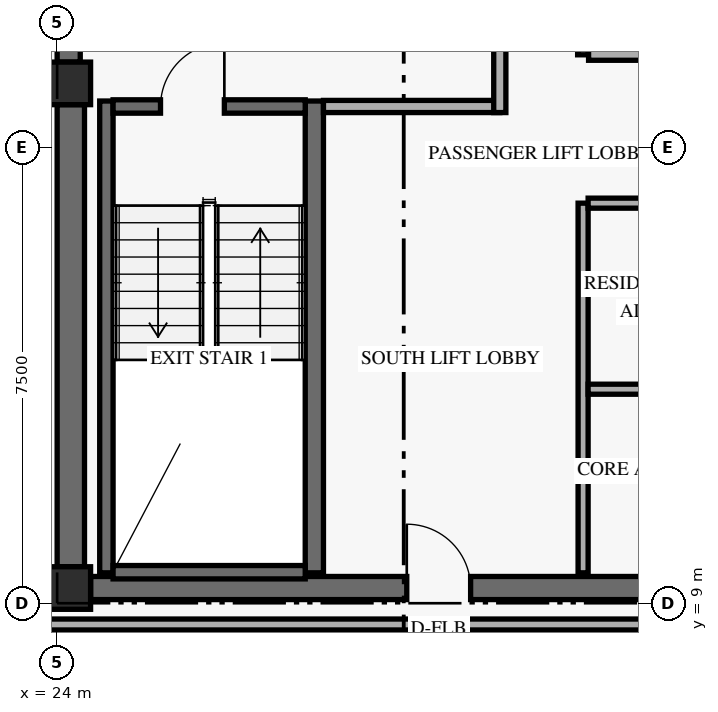
"""IFC4 building model, lengths in metres.
Left out: names, types, materials, properties, quantities, classifications, styles, units other than length and angle.
Written with IfcOpenShell. Run it as: python <this file> out.ifc"""

import sys

from ifc_helpers import new_model, si_unit, direction, frame, frame_2d, origin, origin_2d, place, context, subcontext, project, spatial, rectangle, extrude, element, fill, save


model = new_model("IFC4")
c1 = context("Model", 3, precision=1e-05, world=origin(), true_north=direction((0.0, 1.0)))
c2 = subcontext(c1, "Body", "Model", "MODEL_VIEW")
j1 = project(units=[si_unit("LENGTHUNIT", "METRE"), si_unit("PLANEANGLEUNIT", "RADIAN")], contexts=[c1])
p1 = place(None, origin())
s1 = spatial("IfcSite", under=j1, at=p1, CompositionType="ELEMENT")
p2 = place(p1, origin())
s2 = spatial("IfcBuilding", under=s1, at=p2, CompositionType="ELEMENT")
p3 = place(p2, frame((0.0, 0.0, 181.2)))
s3 = spatial("IfcBuildingStorey", under=s2, at=p3, CompositionType="ELEMENT", Elevation=181.2)
p4 = place(p3, frame((24.225, 9.6, 0.0), z_axis=(0.0, 0.0, 1.0), x_axis=(0.0, 1.0, 0.0)))
e1 = element("IfcWall", 1, at=p4, inside=s3, PredefinedType="SHEAR", context=c2, shape_type="SweptSolid", body=[
    extrude(rectangle(XDim=7.6, YDim=0.45, at=frame_2d((3.8, 0.0))), origin(), (0.0, 0.0, 1.0), 2.748),
])
p5 = place(p3, frame((24.19, 17.9, 0.0), z_axis=(0.0, 0.0, 1.0), x_axis=(0.0, 1.0, 0.0)))
e2 = element("IfcWall", 2, at=p5, inside=s3, PredefinedType="SHEAR", context=c2, shape_type="SweptSolid", body=[
    extrude(rectangle(XDim=11.95, YDim=0.38, at=frame_2d((5.975, 0.0))), origin(), (0.0, 0.0, 1.0), 2.748),
])
p6 = place(p3, frame((24.55, 9.25, 0.0), z_axis=(0.0, 0.0, 1.0), x_axis=(1.0, 0.0, 0.0)))
e3 = element("IfcWall", 3, at=p6, inside=s3, PredefinedType="SHEAR", context=c2, shape_type="SweptSolid", body=[
    extrude(rectangle(XDim=10.3, YDim=0.38, at=frame_2d((5.15, 0.0))), origin(), (0.0, 0.0, 1.0), 3.36),
])
p7 = place(p6, frame((5.2, 0.0, 0.0)))
e4 = element("IfcOpeningElement", 4, at=p7, cuts=e3, PredefinedType="OPENING", context=c2, shape_type="SweptSolid", body=[
    extrude(rectangle(XDim=1.05, YDim=2.15, at=frame_2d((0.525, 1.075))), frame((0.0, 0.2, 0.0), z_axis=(0.0, -1.0, 0.0), x_axis=(1.0, 0.0, 0.0)), (0.0, 0.0, 1.0), 0.4),
])
p8 = place(p3, frame((24.81, 9.5, 0.0), z_axis=(0.0, 0.0, 1.0), x_axis=(0.0, 1.0, 0.0)))
e5 = element("IfcWall", 5, at=p8, inside=s3, PredefinedType="SHEAR", context=c2, shape_type="SweptSolid", body=[
    extrude(rectangle(XDim=7.76, YDim=0.22, at=frame_2d((3.88, 0.0))), origin(), (0.0, 0.0, 1.0), 3.36),
])
p9 = place(p3, frame((28.23, 9.5, 0.0), z_axis=(0.0, 0.0, 1.0), x_axis=(0.0, 1.0, 0.0)))
e6 = element("IfcWall", 6, at=p9, inside=s3, PredefinedType="SHEAR", context=c2, shape_type="SweptSolid", body=[
    extrude(rectangle(XDim=7.76, YDim=0.3, at=frame_2d((3.88, 0.0))), origin(), (0.0, 0.0, 1.0), 3.36),
])
p10 = place(p3, frame((24.92, 9.51, 0.0), z_axis=(0.0, 0.0, 1.0), x_axis=(1.0, 0.0, 0.0)))
e7 = element("IfcWall", 7, at=p10, inside=s3, PredefinedType="SHEAR", context=c2, shape_type="SweptSolid", body=[
    extrude(rectangle(XDim=3.16, YDim=0.22, at=frame_2d((1.58, 0.0))), origin(), (0.0, 0.0, 1.0), 3.36),
])
p11 = place(p3, frame((24.92, 17.17, 0.0), z_axis=(0.0, 0.0, 1.0), x_axis=(1.0, 0.0, 0.0)))
e8 = element("IfcWall", 8, at=p11, inside=s3, PredefinedType="SHEAR", context=c2, shape_type="SweptSolid", body=[
    extrude(rectangle(XDim=3.16, YDim=0.22, at=frame_2d((1.58, 0.0))), origin(), (0.0, 0.0, 1.0), 3.36),
])
p12 = place(p11, frame((0.78, 0.0, 0.0)))
e9 = element("IfcOpeningElement", 9, at=p12, cuts=e8, PredefinedType="OPENING", context=c2, shape_type="SweptSolid", body=[
    extrude(rectangle(XDim=1.05, YDim=2.15, at=frame_2d((0.525, 1.075))), frame((0.0, 0.12, 0.0), z_axis=(0.0, -1.0, 0.0), x_axis=(1.0, 0.0, 0.0)), (0.0, 0.0, 1.0), 0.24),
])
for number, where, z_axis, x_axis in (
    (10, (24.2, 9.25, 0.0), (0.0, 0.0, 1.0), (1.0, 0.0, 0.0)),
    (11, (24.2, 17.55, 0.0), (0.0, 0.0, 1.0), (1.0, 0.0, 0.0)),
):
    element("IfcColumn", number, at=place(p3, frame(where, z_axis=z_axis, x_axis=x_axis)), inside=s3, PredefinedType="COLUMN", context=c2, shape_type="SweptSolid", body=[
        extrude(rectangle(XDim=0.7, YDim=0.7, at=origin_2d()), origin(), (0.0, 0.0, 1.0), 3.6),
    ])
p13 = place(p3, frame((28.38, 17.17, 0.0), z_axis=(0.0, 0.0, 1.0), x_axis=(1.0, 0.0, 0.0)))
e12 = element("IfcWall", 12, at=p13, inside=s3, PredefinedType="STANDARD", context=c2, shape_type="SweptSolid", body=[
    extrude(rectangle(XDim=2.9, YDim=0.2, at=frame_2d((1.45, 0.0))), origin(), (0.0, 0.0, 1.0), 3.36),
])
p14 = place(p3, frame((31.28, 17.07, 0.0), z_axis=(0.0, 0.0, 1.0), x_axis=(0.0, 1.0, 0.0)))
e13 = element("IfcWall", 13, at=p14, inside=s3, PredefinedType="STANDARD", context=c2, shape_type="SweptSolid", body=[
    extrude(rectangle(XDim=3.92, YDim=0.2, at=frame_2d((1.96, 0.0))), origin(), (0.0, 0.0, 1.0), 2.73),
])
p15 = place(p14, frame((1.35, 0.0, 0.0)))
e14 = element("IfcOpeningElement", 14, at=p15, cuts=e13, PredefinedType="OPENING", context=c2, shape_type="SweptSolid", body=[
    extrude(rectangle(XDim=1.2, YDim=2.15, at=frame_2d((0.6, 1.075))), frame((0.0, 0.11, 0.0), z_axis=(0.0, -1.0, 0.0), x_axis=(1.0, 0.0, 0.0)), (0.0, 0.0, 1.0), 0.22),
])
p16 = place(p3, frame((32.65, 18.02, 0.0), z_axis=(0.0, 0.0, 1.0), x_axis=(0.0, 1.0, 0.0)))
e15 = element("IfcWall", 15, at=p16, inside=s3, PredefinedType="STANDARD", context=c2, shape_type="SweptSolid", body=[
    extrude(rectangle(XDim=10.06, YDim=0.18, at=frame_2d((5.03, 0.0))), origin(), (0.0, 0.0, 1.0), 3.36),
])
p17 = place(p3, frame((32.74, 18.02, 0.0), z_axis=(0.0, 0.0, 1.0), x_axis=(1.0, 0.0, 0.0)))
e16 = element("IfcWall", 16, at=p17, inside=s3, PredefinedType="STANDARD", context=c2, shape_type="SweptSolid", body=[
    extrude(rectangle(XDim=2.26, YDim=0.18, at=frame_2d((1.13, 0.0))), origin(), (0.0, 0.0, 1.0), 3.36),
])
p18 = place(p3, frame((32.65, 9.5, 0.0), z_axis=(0.0, 0.0, 1.0), x_axis=(0.0, 1.0, 0.0)))
e17 = element("IfcWall", 17, at=p18, inside=s3, PredefinedType="PARTITIONING", context=c2, shape_type="SweptSolid", body=[
    extrude(rectangle(XDim=6.08, YDim=0.165, at=frame_2d((3.04, 0.0))), origin(), (0.0, 0.0, 1.0), 3.36),
])
p19 = place(p3, frame((32.732, 15.58, 0.0), z_axis=(0.0, 0.0, 1.0), x_axis=(1.0, 0.0, 0.0)))
e18 = element("IfcWall", 18, at=p19, inside=s3, PredefinedType="PARTITIONING", context=c2, shape_type="SweptSolid", body=[
    extrude(rectangle(XDim=4.818, YDim=0.165, at=frame_2d((2.409, 0.0))), origin(), (0.0, 0.0, 1.0), 2.73),
])
p20 = place(p19, frame((2.867, 0.0, 0.0)))
e19 = element("IfcOpeningElement", 19, at=p20, cuts=e18, PredefinedType="OPENING", context=c2, shape_type="SweptSolid", body=[
    extrude(rectangle(XDim=0.95, YDim=2.15, at=frame_2d((0.475, 1.075))), frame((0.0, 0.093, 0.0), z_axis=(0.0, -1.0, 0.0), x_axis=(1.0, 0.0, 0.0)), (0.0, 0.0, 1.0), 0.185),
])
p21 = place(p3, frame((32.732, 12.52, 0.0), z_axis=(0.0, 0.0, 1.0), x_axis=(1.0, 0.0, 0.0)))
e20 = element("IfcWall", 20, at=p21, inside=s3, PredefinedType="PARTITIONING", context=c2, shape_type="SweptSolid", body=[
    extrude(rectangle(XDim=4.735, YDim=0.165, at=frame_2d((2.368, 0.0))), origin(), (0.0, 0.0, 1.0), 2.73),
])
p22 = place(p21, frame((2.768, 0.0, 0.0)))
e21 = element("IfcOpeningElement", 21, at=p22, cuts=e20, PredefinedType="OPENING", context=c2, shape_type="SweptSolid", body=[
    extrude(rectangle(XDim=0.9, YDim=2.1, at=frame_2d((0.45, 1.05))), frame((0.0, 0.093, 0.0), z_axis=(0.0, -1.0, 0.0), x_axis=(1.0, 0.0, 0.0)), (0.0, 0.0, 1.0), 0.185),
])
p23 = place(p3, frame((23.85, 8.65, 0.0), z_axis=(0.0, 0.0, 1.0), x_axis=(1.0, 0.0, 0.0)))
e22 = element("IfcWall", 22, at=p23, inside=s3, PredefinedType="STANDARD", context=c2, shape_type="SweptSolid", body=[
    extrude(rectangle(XDim=11.57, YDim=0.18, at=frame_2d((5.785, 0.0))), origin(), (0.0, 0.0, 1.0), 2.73),
])
p24 = place(p12, frame((1.05, 0.0, 0.0), z_axis=(0.0, 0.0, 1.0), x_axis=(-1.0, 0.0, 0.0)))
e23 = element("IfcDoor", 23, at=p24, inside=s3, OperationType="SINGLE_SWING_LEFT", PredefinedType="DOOR", context=c2, shape_type="SweptSolid", body=[
    extrude(rectangle(XDim=1.05, YDim=2.15, at=frame_2d((0.525, 1.075))), frame((0.0, 0.025, 0.0), z_axis=(0.0, -1.0, 0.0), x_axis=(1.0, 0.0, 0.0)), (0.0, 0.0, 1.0), 0.05),
])
fill(e9, e23)
p25 = place(p7, origin())
e24 = element("IfcDoor", 24, at=p25, inside=s3, OperationType="SINGLE_SWING_LEFT", PredefinedType="DOOR", context=c2, shape_type="SweptSolid", body=[
    extrude(rectangle(XDim=1.05, YDim=2.15, at=frame_2d((0.525, 1.075))), frame((0.0, 0.025, 0.0), z_axis=(0.0, -1.0, 0.0), x_axis=(1.0, 0.0, 0.0)), (0.0, 0.0, 1.0), 0.05),
])
fill(e4, e24)
save(model, sys.argv[1])
